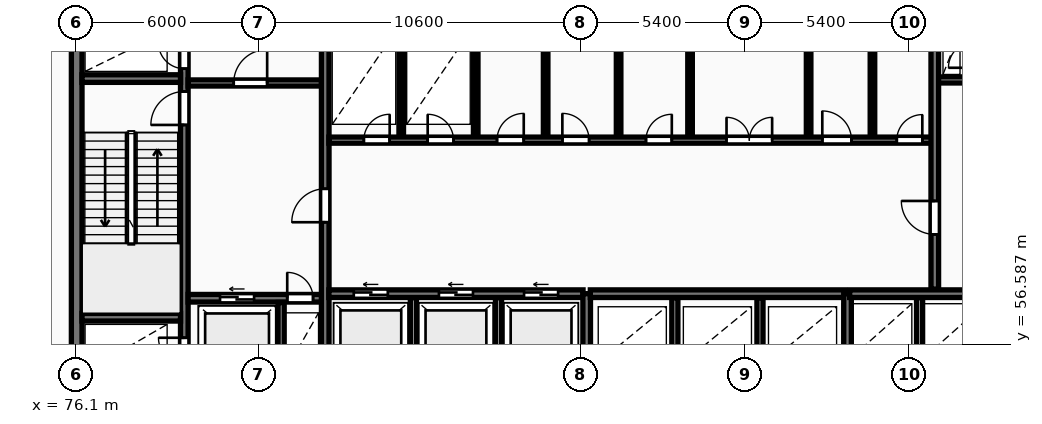
"""IFC4 building model, lengths in metres.
Left out: names, types, materials, properties, quantities, classifications, styles, units other than length and angle.
Written with IfcOpenShell. Run it as: python <this file> out.ifc"""

import sys

from ifc_helpers import new_model, si_unit, direction, frame, frame_2d, origin, place, context, subcontext, project, spatial, rectangle, extrude, element, fill, save


model = new_model("IFC4")
c1 = context("Model", 3, precision=1e-05, world=origin(), true_north=direction((0.0, 1.0)))
c2 = subcontext(c1, "Body", "Model", "MODEL_VIEW")
j1 = project(units=[si_unit("LENGTHUNIT", "METRE"), si_unit("PLANEANGLEUNIT", "RADIAN")], contexts=[c1])
p1 = place(None, origin())
s1 = spatial("IfcSite", under=j1, at=p1, CompositionType="ELEMENT")
p2 = place(p1, origin())
s2 = spatial("IfcBuilding", under=s1, at=p2, CompositionType="ELEMENT")
p3 = place(p2, frame((0.0, 0.0, 19.0)))
s3 = spatial("IfcBuildingStorey", under=s2, at=p3, CompositionType="ELEMENT", Elevation=19.0)
p4 = place(p3, frame((76.125, 55.375, 0.0), z_axis=(0.0, 0.0, 1.0), x_axis=(0.0, 1.0, 0.0)))
e1 = element("IfcWall", 1, at=p4, inside=s3, PredefinedType="SHEAR", context=c2, shape_type="SweptSolid", body=[
    extrude(rectangle(XDim=11.65, YDim=0.35, at=frame_2d((5.825, 0.0))), origin(), (0.0, 0.0, 1.0), 5.0),
])
p5 = place(p3, frame((79.665, 55.4, 0.0), z_axis=(0.0, 0.0, 1.0), x_axis=(0.0, 1.0, 0.0)))
e2 = element("IfcWall", 2, at=p5, inside=s3, PredefinedType="SHEAR", context=c2, shape_type="SweptSolid", body=[
    extrude(rectangle(XDim=11.6, YDim=0.25, at=frame_2d((5.8, 0.0))), origin(), (0.0, 0.0, 1.0), 5.0),
])
p6 = place(p5, frame((0.55, 0.0, 0.0)))
e3 = element("IfcOpeningElement", 3, at=p6, cuts=e2, PredefinedType="OPENING", context=c2, shape_type="SweptSolid", body=[
    extrude(rectangle(XDim=0.85, YDim=2.05, at=frame_2d((0.425, 1.025))), frame((0.0, 0.135, 0.0), z_axis=(0.0, -1.0, 0.0), x_axis=(1.0, 0.0, 0.0)), (0.0, 0.0, 1.0), 0.27),
])
p7 = place(p5, frame((8.4, 0.0, 0.0)))
e4 = element("IfcOpeningElement", 4, at=p7, cuts=e2, PredefinedType="OPENING", context=c2, shape_type="SweptSolid", body=[
    extrude(rectangle(XDim=1.1, YDim=2.1, at=frame_2d((0.55, 1.05))), frame((0.0, 0.135, 0.0), z_axis=(0.0, -1.0, 0.0), x_axis=(1.0, 0.0, 0.0)), (0.0, 0.0, 1.0), 0.27),
])
p8 = place(p5, frame((10.25, 0.0, 0.0)))
e5 = element("IfcOpeningElement", 5, at=p8, cuts=e2, PredefinedType="OPENING", context=c2, shape_type="SweptSolid", body=[
    extrude(rectangle(XDim=0.85, YDim=2.05, at=frame_2d((0.425, 1.025))), frame((0.0, 0.135, 0.0), z_axis=(0.0, -1.0, 0.0), x_axis=(1.0, 0.0, 0.0)), (0.0, 0.0, 1.0), 0.27),
])
for number, where, z_axis, x_axis in (
    (6, (76.3, 57.475, 0.0), (0.0, 0.0, 1.0), (1.0, 0.0, 0.0)),
    (7, (76.3, 65.325, 0.0), (0.0, 0.0, 1.0), (1.0, 0.0, 0.0)),
):
    element("IfcWall", number, at=place(p3, frame(where, z_axis=z_axis, x_axis=x_axis)), inside=s3, PredefinedType="SHEAR", context=c2, shape_type="SweptSolid", body=[
        extrude(rectangle(XDim=3.24, YDim=0.25, at=frame_2d((1.62, 0.0))), origin(), (0.0, 0.0, 1.0), 5.0),
    ])
p9 = place(p3, frame((79.79, 58.1, 0.0), z_axis=(0.0, 0.0, 1.0), x_axis=(1.0, 0.0, 0.0)))
e8 = element("IfcWall", 8, at=p9, inside=s3, PredefinedType="SHEAR", context=c2, shape_type="SweptSolid", body=[
    extrude(rectangle(XDim=4.39, YDim=0.25, at=frame_2d((2.195, 0.0))), origin(), (0.0, 0.0, 1.0), 5.0),
])
p10 = place(p9, frame((1.05, 0.0, 0.0)))
e9 = element("IfcOpeningElement", 9, at=p10, cuts=e8, PredefinedType="OPENING", context=c2, shape_type="SweptSolid", body=[
    extrude(rectangle(XDim=1.12, YDim=2.12, at=frame_2d((0.56, 1.06))), frame((0.0, 0.135, 0.0), z_axis=(0.0, -1.0, 0.0), x_axis=(1.0, 0.0, 0.0)), (0.0, 0.0, 1.0), 0.27),
])
p11 = place(p9, frame((3.26, 0.0, 0.0)))
e10 = element("IfcOpeningElement", 10, at=p11, cuts=e8, PredefinedType="OPENING", context=c2, shape_type="SweptSolid", body=[
    extrude(rectangle(XDim=0.85, YDim=2.05, at=frame_2d((0.425, 1.025))), frame((0.0, 0.135, 0.0), z_axis=(0.0, -1.0, 0.0), x_axis=(1.0, 0.0, 0.0)), (0.0, 0.0, 1.0), 0.27),
])
p12 = place(p3, frame((82.85, 55.4, 0.0), z_axis=(0.0, 0.0, 1.0), x_axis=(0.0, 1.0, 0.0)))
e11 = element("IfcWall", 11, at=p12, inside=s3, PredefinedType="PARTITIONING", context=c2, shape_type="SweptSolid", body=[
    extrude(rectangle(XDim=2.56, YDim=0.2, at=frame_2d((1.28, 0.0))), origin(), (0.0, 0.0, 1.0), 4.68),
])
p13 = place(p3, frame((79.79, 65.18, 0.0), z_axis=(0.0, 0.0, 1.0), x_axis=(1.0, 0.0, 0.0)))
e12 = element("IfcWall", 12, at=p13, inside=s3, PredefinedType="PARTITIONING", context=c2, shape_type="SweptSolid", body=[
    extrude(rectangle(XDim=4.39, YDim=0.2, at=frame_2d((2.195, 0.0))), origin(), (0.0, 0.0, 1.0), 4.68),
])
p14 = place(p13, frame((1.5, 0.0, 0.0)))
e13 = element("IfcOpeningElement", 13, at=p14, cuts=e12, PredefinedType="OPENING", context=c2, shape_type="SweptSolid", body=[
    extrude(rectangle(XDim=1.1, YDim=2.1, at=frame_2d((0.55, 1.05))), frame((0.0, 0.11, 0.0), z_axis=(0.0, -1.0, 0.0), x_axis=(1.0, 0.0, 0.0)), (0.0, 0.0, 1.0), 0.22),
])
p15 = place(p3, frame((84.3, 55.4, 0.0), z_axis=(0.0, 0.0, 1.0), x_axis=(0.0, 1.0, 0.0)))
e14 = element("IfcWall", 14, at=p15, inside=s3, PredefinedType="SHEAR", context=c2, shape_type="SweptSolid", body=[
    extrude(rectangle(XDim=11.6, YDim=0.25, at=frame_2d((5.8, 0.0))), origin(), (0.0, 0.0, 1.0), 5.0),
])
p16 = place(p15, frame((5.2, 0.0, 0.0)))
e15 = element("IfcOpeningElement", 15, at=p16, cuts=e14, PredefinedType="OPENING", context=c2, shape_type="SweptSolid", body=[
    extrude(rectangle(XDim=1.1, YDim=2.1, at=frame_2d((0.55, 1.05))), frame((0.0, 0.135, 0.0), z_axis=(0.0, -1.0, 0.0), x_axis=(1.0, 0.0, 0.0)), (0.0, 0.0, 1.0), 0.27),
])
for number, where, z_axis, x_axis in (
    (16, (87.2, 55.4, 0.0), (0.0, 0.0, 1.0), (0.0, 1.0, 0.0)),
    (17, (90.0, 55.4, 0.0), (0.0, 0.0, 1.0), (0.0, 1.0, 0.0)),
):
    element("IfcWall", number, at=place(p3, frame(where, z_axis=z_axis, x_axis=x_axis)), inside=s3, PredefinedType="PARTITIONING", context=c2, shape_type="SweptSolid", body=[
        extrude(rectangle(XDim=2.72, YDim=0.2, at=frame_2d((1.36, 0.0))), origin(), (0.0, 0.0, 1.0), 4.68),
    ])
p17 = place(p3, frame((84.42, 58.25, 0.0), z_axis=(0.0, 0.0, 1.0), x_axis=(1.0, 0.0, 0.0)))
e18 = element("IfcWall", 18, at=p17, inside=s3, PredefinedType="SHEAR", context=c2, shape_type="SweptSolid", body=[
    extrude(rectangle(XDim=8.36, YDim=0.25, at=frame_2d((4.18, 0.0))), origin(), (0.0, 0.0, 1.0), 5.0),
])
p18 = place(p17, frame((0.82, 0.0, 0.0)))
e19 = element("IfcOpeningElement", 19, at=p18, cuts=e18, PredefinedType="OPENING", context=c2, shape_type="SweptSolid", body=[
    extrude(rectangle(XDim=1.12, YDim=2.12, at=frame_2d((0.56, 1.06))), frame((0.0, 0.135, 0.0), z_axis=(0.0, -1.0, 0.0), x_axis=(1.0, 0.0, 0.0)), (0.0, 0.0, 1.0), 0.27),
])
p19 = place(p17, frame((3.62, 0.0, 0.0)))
e20 = element("IfcOpeningElement", 20, at=p19, cuts=e18, PredefinedType="OPENING", context=c2, shape_type="SweptSolid", body=[
    extrude(rectangle(XDim=1.12, YDim=2.12, at=frame_2d((0.56, 1.06))), frame((0.0, 0.135, 0.0), z_axis=(0.0, -1.0, 0.0), x_axis=(1.0, 0.0, 0.0)), (0.0, 0.0, 1.0), 0.27),
])
p20 = place(p17, frame((6.42, 0.0, 0.0)))
e21 = element("IfcOpeningElement", 21, at=p20, cuts=e18, PredefinedType="OPENING", context=c2, shape_type="SweptSolid", body=[
    extrude(rectangle(XDim=1.12, YDim=2.12, at=frame_2d((0.56, 1.06))), frame((0.0, 0.135, 0.0), z_axis=(0.0, -1.0, 0.0), x_axis=(1.0, 0.0, 0.0)), (0.0, 0.0, 1.0), 0.27),
])
p21 = place(p3, frame((92.9, 55.4, 0.0), z_axis=(0.0, 0.0, 1.0), x_axis=(0.0, 1.0, 0.0)))
e22 = element("IfcWall", 22, at=p21, inside=s3, PredefinedType="SHEAR", context=c2, shape_type="SweptSolid", body=[
    extrude(rectangle(XDim=2.85, YDim=0.25, at=frame_2d((1.425, 0.0))), origin(), (0.0, 0.0, 1.0), 5.0),
])
for number, where, z_axis, x_axis in (
    (23, (95.8, 55.4, 0.0), (0.0, 0.0, 1.0), (0.0, 1.0, 0.0)),
    (24, (98.6, 55.4, 0.0), (0.0, 0.0, 1.0), (0.0, 1.0, 0.0)),
):
    element("IfcWall", number, at=place(p3, frame(where, z_axis=z_axis, x_axis=x_axis)), inside=s3, PredefinedType="PARTITIONING", context=c2, shape_type="SweptSolid", body=[
        extrude(rectangle(XDim=2.72, YDim=0.2, at=frame_2d((1.36, 0.0))), origin(), (0.0, 0.0, 1.0), 4.68),
    ])
p22 = place(p3, frame((93.02, 58.25, 0.0), z_axis=(0.0, 0.0, 1.0), x_axis=(1.0, 0.0, 0.0)))
e25 = element("IfcWall", 25, at=p22, inside=s3, PredefinedType="SHEAR", context=c2, shape_type="SweptSolid", body=[
    extrude(rectangle(XDim=8.36, YDim=0.25, at=frame_2d((4.18, 0.0))), origin(), (0.0, 0.0, 1.0), 5.0),
])
p23 = place(p3, frame((101.48, 55.4, 0.0), z_axis=(0.0, 0.0, 1.0), x_axis=(0.0, 1.0, 0.0)))
e26 = element("IfcWall", 26, at=p23, inside=s3, PredefinedType="SHEAR", context=c2, shape_type="SweptSolid", body=[
    extrude(rectangle(XDim=2.85, YDim=0.25, at=frame_2d((1.425, 0.0))), origin(), (0.0, 0.0, 1.0), 5.0),
])
p24 = place(p3, frame((103.85, 55.4, 0.0), z_axis=(0.0, 0.0, 1.0), x_axis=(0.0, 1.0, 0.0)))
e27 = element("IfcWall", 27, at=p24, inside=s3, PredefinedType="PARTITIONING", context=c2, shape_type="SweptSolid", body=[
    extrude(rectangle(XDim=2.72, YDim=0.2, at=frame_2d((1.36, 0.0))), origin(), (0.0, 0.0, 1.0), 4.68),
])
p25 = place(p3, frame((101.55, 58.25, 0.0), z_axis=(0.0, 0.0, 1.0), x_axis=(1.0, 0.0, 0.0)))
e28 = element("IfcWall", 28, at=p25, inside=s3, PredefinedType="SHEAR", context=c2, shape_type="SweptSolid", body=[
    extrude(rectangle(XDim=4.6, YDim=0.25, at=frame_2d((2.3, 0.0))), origin(), (0.0, 0.0, 1.0), 5.0),
])
for number, where, z_axis, x_axis in (
    (29, (86.8, 63.4, 0.0), (0.0, 0.0, 1.0), (0.0, 1.0, 0.0)),
    (30, (89.25, 63.4, 0.0), (0.0, 0.0, 1.0), (0.0, 1.0, 0.0)),
    (31, (91.55, 63.4, 0.0), (0.0, 0.0, 1.0), (0.0, 1.0, 0.0)),
):
    element("IfcWall", number, at=place(p3, frame(where, z_axis=z_axis, x_axis=x_axis)), inside=s3, PredefinedType="PARTITIONING", context=c2, shape_type="SweptSolid", body=[
        extrude(rectangle(XDim=3.6, YDim=0.15, at=frame_2d((1.8, 0.0))), origin(), (0.0, 0.0, 1.0), 4.68),
    ])
for number, where, z_axis, x_axis in (
    (32, (93.95, 63.4, 0.0), (0.0, 0.0, 1.0), (0.0, 1.0, 0.0)),
    (33, (102.3, 63.4, 0.0), (0.0, 0.0, 1.0), (0.0, 1.0, 0.0)),
):
    element("IfcWall", number, at=place(p3, frame(where, z_axis=z_axis, x_axis=x_axis)), inside=s3, PredefinedType="PARTITIONING", context=c2, shape_type="SweptSolid", body=[
        extrude(rectangle(XDim=3.6, YDim=0.15, at=frame_2d((1.8, 0.0))), origin(), (0.0, 0.0, 1.0), 3.43),
    ])
for number, where, z_axis, x_axis in (
    (34, (96.3, 63.4, 0.0), (0.0, 0.0, 1.0), (0.0, 1.0, 0.0)),
    (35, (100.2, 63.4, 0.0), (0.0, 0.0, 1.0), (0.0, 1.0, 0.0)),
):
    element("IfcWall", number, at=place(p3, frame(where, z_axis=z_axis, x_axis=x_axis)), inside=s3, PredefinedType="PARTITIONING", context=c2, shape_type="SweptSolid", body=[
        extrude(rectangle(XDim=3.6, YDim=0.15, at=frame_2d((1.8, 0.0))), origin(), (0.0, 0.0, 1.0), 4.68),
    ])
p26 = place(p3, frame((84.42, 63.3, 0.0), z_axis=(0.0, 0.0, 1.0), x_axis=(1.0, 0.0, 0.0)))
e36 = element("IfcWall", 36, at=p26, inside=s3, PredefinedType="PARTITIONING", context=c2, shape_type="SweptSolid", body=[
    extrude(rectangle(XDim=19.83, YDim=0.2, at=frame_2d((9.915, 0.0))), origin(), (0.0, 0.0, 1.0), 4.68),
])
p27 = place(p26, frame((1.15, 0.0, 0.0)))
e37 = element("IfcOpeningElement", 37, at=p27, cuts=e36, PredefinedType="OPENING", context=c2, shape_type="SweptSolid", body=[
    extrude(rectangle(XDim=0.85, YDim=2.05, at=frame_2d((0.425, 1.025))), frame((0.0, 0.11, 0.0), z_axis=(0.0, -1.0, 0.0), x_axis=(1.0, 0.0, 0.0)), (0.0, 0.0, 1.0), 0.22),
])
p28 = place(p26, frame((3.25, 0.0, 0.0)))
e38 = element("IfcOpeningElement", 38, at=p28, cuts=e36, PredefinedType="OPENING", context=c2, shape_type="SweptSolid", body=[
    extrude(rectangle(XDim=0.85, YDim=2.05, at=frame_2d((0.425, 1.025))), frame((0.0, 0.11, 0.0), z_axis=(0.0, -1.0, 0.0), x_axis=(1.0, 0.0, 0.0)), (0.0, 0.0, 1.0), 0.22),
])
p29 = place(p26, frame((13.08, 0.0, 0.0)))
e39 = element("IfcOpeningElement", 39, at=p29, cuts=e36, PredefinedType="OPENING", context=c2, shape_type="SweptSolid", body=[
    extrude(rectangle(XDim=1.5, YDim=2.2, at=frame_2d((0.75, 1.1))), frame((0.0, 0.11, 0.0), z_axis=(0.0, -1.0, 0.0), x_axis=(1.0, 0.0, 0.0)), (0.0, 0.0, 1.0), 0.22),
])
p30 = place(p26, frame((5.53, 0.0, 0.0)))
e40 = element("IfcOpeningElement", 40, at=p30, cuts=e36, PredefinedType="OPENING", context=c2, shape_type="SweptSolid", body=[
    extrude(rectangle(XDim=0.88, YDim=2.06, at=frame_2d((0.44, 1.03))), frame((0.0, 0.11, 0.0), z_axis=(0.0, -1.0, 0.0), x_axis=(1.0, 0.0, 0.0)), (0.0, 0.0, 1.0), 0.22),
])
p31 = place(p26, frame((7.68, 0.0, 0.0)))
e41 = element("IfcOpeningElement", 41, at=p31, cuts=e36, PredefinedType="OPENING", context=c2, shape_type="SweptSolid", body=[
    extrude(rectangle(XDim=0.88, YDim=2.06, at=frame_2d((0.44, 1.03))), frame((0.0, 0.11, 0.0), z_axis=(0.0, -1.0, 0.0), x_axis=(1.0, 0.0, 0.0)), (0.0, 0.0, 1.0), 0.22),
])
p32 = place(p26, frame((10.43, 0.0, 0.0)))
e42 = element("IfcOpeningElement", 42, at=p32, cuts=e36, PredefinedType="OPENING", context=c2, shape_type="SweptSolid", body=[
    extrude(rectangle(XDim=0.85, YDim=2.05, at=frame_2d((0.425, 1.025))), frame((0.0, 0.11, 0.0), z_axis=(0.0, -1.0, 0.0), x_axis=(1.0, 0.0, 0.0)), (0.0, 0.0, 1.0), 0.22),
])
p33 = place(p26, frame((16.23, 0.0, 0.0)))
e43 = element("IfcOpeningElement", 43, at=p33, cuts=e36, PredefinedType="OPENING", context=c2, shape_type="SweptSolid", body=[
    extrude(rectangle(XDim=0.96, YDim=2.1, at=frame_2d((0.48, 1.05))), frame((0.0, 0.11, 0.0), z_axis=(0.0, -1.0, 0.0), x_axis=(1.0, 0.0, 0.0)), (0.0, 0.0, 1.0), 0.22),
])
p34 = place(p26, frame((18.68, 0.0, 0.0)))
e44 = element("IfcOpeningElement", 44, at=p34, cuts=e36, PredefinedType="OPENING", context=c2, shape_type="SweptSolid", body=[
    extrude(rectangle(XDim=0.84, YDim=2.04, at=frame_2d((0.42, 1.02))), frame((0.0, 0.11, 0.0), z_axis=(0.0, -1.0, 0.0), x_axis=(1.0, 0.0, 0.0)), (0.0, 0.0, 1.0), 0.22),
])
p35 = place(p3, frame((104.45, 65.28, 0.0), z_axis=(0.0, 0.0, 1.0), x_axis=(1.0, 0.0, 0.0)))
e45 = element("IfcWall", 45, at=p35, inside=s3, PredefinedType="PARTITIONING", context=c2, shape_type="SweptSolid", body=[
    extrude(rectangle(XDim=1.2, YDim=0.2, at=frame_2d((0.6, 0.0))), origin(), (0.0, 0.0, 1.0), 4.68),
])
p36 = place(p3, frame((104.35, 58.4, 0.0), z_axis=(0.0, 0.0, 1.0), x_axis=(0.0, 1.0, 0.0)))
e46 = element("IfcWall", 46, at=p36, inside=s3, PredefinedType="SHEAR", context=c2, shape_type="SweptSolid", body=[
    extrude(rectangle(XDim=8.6, YDim=0.25, at=frame_2d((4.3, 0.0))), origin(), (0.0, 0.0, 1.0), 5.0),
])
p37 = place(p36, frame((1.8, 0.0, 0.0)))
e47 = element("IfcOpeningElement", 47, at=p37, cuts=e46, PredefinedType="OPENING", context=c2, shape_type="SweptSolid", body=[
    extrude(rectangle(XDim=1.1, YDim=2.1, at=frame_2d((0.55, 1.05))), frame((0.0, 0.135, 0.0), z_axis=(0.0, -1.0, 0.0), x_axis=(1.0, 0.0, 0.0)), (0.0, 0.0, 1.0), 0.27),
])
p38 = place(p6, origin())
e48 = element("IfcDoor", 48, at=p38, inside=s3, OperationType="SINGLE_SWING_RIGHT", PredefinedType="DOOR", context=c2, shape_type="SweptSolid", body=[
    extrude(rectangle(XDim=0.85, YDim=2.05, at=frame_2d((0.425, 1.025))), frame((0.0, 0.025, 0.0), z_axis=(0.0, -1.0, 0.0), x_axis=(1.0, 0.0, 0.0)), (0.0, 0.0, 1.0), 0.05),
])
fill(e3, e48)
p39 = place(p7, origin())
e49 = element("IfcDoor", 49, at=p39, inside=s3, OperationType="SINGLE_SWING_LEFT", PredefinedType="DOOR", context=c2, shape_type="SweptSolid", body=[
    extrude(rectangle(XDim=1.1, YDim=2.1, at=frame_2d((0.55, 1.05))), frame((0.0, 0.025, 0.0), z_axis=(0.0, -1.0, 0.0), x_axis=(1.0, 0.0, 0.0)), (0.0, 0.0, 1.0), 0.05),
])
fill(e4, e49)
p40 = place(p8, origin())
e50 = element("IfcDoor", 50, at=p40, inside=s3, OperationType="SINGLE_SWING_RIGHT", PredefinedType="DOOR", context=c2, shape_type="SweptSolid", body=[
    extrude(rectangle(XDim=0.85, YDim=2.05, at=frame_2d((0.425, 1.025))), frame((0.0, 0.025, 0.0), z_axis=(0.0, -1.0, 0.0), x_axis=(1.0, 0.0, 0.0)), (0.0, 0.0, 1.0), 0.05),
])
fill(e5, e50)
p41 = place(p10, origin())
e51 = element("IfcDoor", 51, at=p41, inside=s3, OperationType="SLIDING_TO_LEFT", PredefinedType="DOOR", context=c2, shape_type="SweptSolid", body=[
    extrude(rectangle(XDim=1.12, YDim=2.12, at=frame_2d((0.56, 1.06))), frame((0.0, 0.025, 0.0), z_axis=(0.0, -1.0, 0.0), x_axis=(1.0, 0.0, 0.0)), (0.0, 0.0, 1.0), 0.05),
])
fill(e9, e51)
p42 = place(p11, origin())
e52 = element("IfcDoor", 52, at=p42, inside=s3, OperationType="SINGLE_SWING_LEFT", PredefinedType="DOOR", context=c2, shape_type="SweptSolid", body=[
    extrude(rectangle(XDim=0.85, YDim=2.05, at=frame_2d((0.425, 1.025))), frame((0.0, 0.025, 0.0), z_axis=(0.0, -1.0, 0.0), x_axis=(1.0, 0.0, 0.0)), (0.0, 0.0, 1.0), 0.05),
])
fill(e10, e52)
p43 = place(p14, origin())
e53 = element("IfcDoor", 53, at=p43, inside=s3, OperationType="SINGLE_SWING_RIGHT", PredefinedType="DOOR", context=c2, shape_type="SweptSolid", body=[
    extrude(rectangle(XDim=1.1, YDim=2.1, at=frame_2d((0.55, 1.05))), frame((0.0, 0.025, 0.0), z_axis=(0.0, -1.0, 0.0), x_axis=(1.0, 0.0, 0.0)), (0.0, 0.0, 1.0), 0.05),
])
fill(e13, e53)
p44 = place(p16, origin())
e54 = element("IfcDoor", 54, at=p44, inside=s3, OperationType="SINGLE_SWING_LEFT", PredefinedType="DOOR", context=c2, shape_type="SweptSolid", body=[
    extrude(rectangle(XDim=1.1, YDim=2.1, at=frame_2d((0.55, 1.05))), frame((0.0, 0.025, 0.0), z_axis=(0.0, -1.0, 0.0), x_axis=(1.0, 0.0, 0.0)), (0.0, 0.0, 1.0), 0.05),
])
fill(e15, e54)
p45 = place(p18, origin())
e55 = element("IfcDoor", 55, at=p45, inside=s3, OperationType="SLIDING_TO_LEFT", PredefinedType="DOOR", context=c2, shape_type="SweptSolid", body=[
    extrude(rectangle(XDim=1.12, YDim=2.12, at=frame_2d((0.56, 1.06))), frame((0.0, 0.025, 0.0), z_axis=(0.0, -1.0, 0.0), x_axis=(1.0, 0.0, 0.0)), (0.0, 0.0, 1.0), 0.05),
])
fill(e19, e55)
p46 = place(p19, origin())
e56 = element("IfcDoor", 56, at=p46, inside=s3, OperationType="SLIDING_TO_LEFT", PredefinedType="DOOR", context=c2, shape_type="SweptSolid", body=[
    extrude(rectangle(XDim=1.12, YDim=2.12, at=frame_2d((0.56, 1.06))), frame((0.0, 0.025, 0.0), z_axis=(0.0, -1.0, 0.0), x_axis=(1.0, 0.0, 0.0)), (0.0, 0.0, 1.0), 0.05),
])
fill(e20, e56)
p47 = place(p20, origin())
e57 = element("IfcDoor", 57, at=p47, inside=s3, OperationType="SLIDING_TO_LEFT", PredefinedType="DOOR", context=c2, shape_type="SweptSolid", body=[
    extrude(rectangle(XDim=1.12, YDim=2.12, at=frame_2d((0.56, 1.06))), frame((0.0, 0.025, 0.0), z_axis=(0.0, -1.0, 0.0), x_axis=(1.0, 0.0, 0.0)), (0.0, 0.0, 1.0), 0.05),
])
fill(e21, e57)
p48 = place(p27, origin())
e58 = element("IfcDoor", 58, at=p48, inside=s3, OperationType="SINGLE_SWING_RIGHT", PredefinedType="DOOR", context=c2, shape_type="SweptSolid", body=[
    extrude(rectangle(XDim=0.85, YDim=2.05, at=frame_2d((0.425, 1.025))), frame((0.0, 0.025, 0.0), z_axis=(0.0, -1.0, 0.0), x_axis=(1.0, 0.0, 0.0)), (0.0, 0.0, 1.0), 0.05),
])
fill(e37, e58)
p49 = place(p28, origin())
e59 = element("IfcDoor", 59, at=p49, inside=s3, OperationType="SINGLE_SWING_LEFT", PredefinedType="DOOR", context=c2, shape_type="SweptSolid", body=[
    extrude(rectangle(XDim=0.85, YDim=2.05, at=frame_2d((0.425, 1.025))), frame((0.0, 0.025, 0.0), z_axis=(0.0, -1.0, 0.0), x_axis=(1.0, 0.0, 0.0)), (0.0, 0.0, 1.0), 0.05),
])
fill(e38, e59)
p50 = place(p29, origin())
e60 = element("IfcDoor", 60, at=p50, inside=s3, OperationType="DOUBLE_DOOR_SINGLE_SWING", PredefinedType="DOOR", context=c2, shape_type="SweptSolid", body=[
    extrude(rectangle(XDim=1.5, YDim=2.2, at=frame_2d((0.75, 1.1))), frame((0.0, 0.025, 0.0), z_axis=(0.0, -1.0, 0.0), x_axis=(1.0, 0.0, 0.0)), (0.0, 0.0, 1.0), 0.05),
])
fill(e39, e60)
p51 = place(p30, origin())
e61 = element("IfcDoor", 61, at=p51, inside=s3, OperationType="SINGLE_SWING_RIGHT", PredefinedType="DOOR", context=c2, shape_type="SweptSolid", body=[
    extrude(rectangle(XDim=0.88, YDim=2.06, at=frame_2d((0.44, 1.03))), frame((0.0, 0.025, 0.0), z_axis=(0.0, -1.0, 0.0), x_axis=(1.0, 0.0, 0.0)), (0.0, 0.0, 1.0), 0.05),
])
fill(e40, e61)
p52 = place(p31, origin())
e62 = element("IfcDoor", 62, at=p52, inside=s3, OperationType="SINGLE_SWING_LEFT", PredefinedType="DOOR", context=c2, shape_type="SweptSolid", body=[
    extrude(rectangle(XDim=0.88, YDim=2.06, at=frame_2d((0.44, 1.03))), frame((0.0, 0.025, 0.0), z_axis=(0.0, -1.0, 0.0), x_axis=(1.0, 0.0, 0.0)), (0.0, 0.0, 1.0), 0.05),
])
fill(e41, e62)
p53 = place(p32, origin())
e63 = element("IfcDoor", 63, at=p53, inside=s3, OperationType="SINGLE_SWING_RIGHT", PredefinedType="DOOR", context=c2, shape_type="SweptSolid", body=[
    extrude(rectangle(XDim=0.85, YDim=2.05, at=frame_2d((0.425, 1.025))), frame((0.0, 0.025, 0.0), z_axis=(0.0, -1.0, 0.0), x_axis=(1.0, 0.0, 0.0)), (0.0, 0.0, 1.0), 0.05),
])
fill(e42, e63)
p54 = place(p33, origin())
e64 = element("IfcDoor", 64, at=p54, inside=s3, OperationType="SINGLE_SWING_LEFT", PredefinedType="DOOR", context=c2, shape_type="SweptSolid", body=[
    extrude(rectangle(XDim=0.96, YDim=2.1, at=frame_2d((0.48, 1.05))), frame((0.0, 0.025, 0.0), z_axis=(0.0, -1.0, 0.0), x_axis=(1.0, 0.0, 0.0)), (0.0, 0.0, 1.0), 0.05),
])
fill(e43, e64)
p55 = place(p34, origin())
e65 = element("IfcDoor", 65, at=p55, inside=s3, OperationType="SINGLE_SWING_RIGHT", PredefinedType="DOOR", context=c2, shape_type="SweptSolid", body=[
    extrude(rectangle(XDim=0.84, YDim=2.04, at=frame_2d((0.42, 1.02))), frame((0.0, 0.025, 0.0), z_axis=(0.0, -1.0, 0.0), x_axis=(1.0, 0.0, 0.0)), (0.0, 0.0, 1.0), 0.05),
])
fill(e44, e65)
p56 = place(p37, origin())
e66 = element("IfcDoor", 66, at=p56, inside=s3, OperationType="SINGLE_SWING_RIGHT", PredefinedType="DOOR", context=c2, shape_type="SweptSolid", body=[
    extrude(rectangle(XDim=1.1, YDim=2.1, at=frame_2d((0.55, 1.05))), frame((0.0, 0.025, 0.0), z_axis=(0.0, -1.0, 0.0), x_axis=(1.0, 0.0, 0.0)), (0.0, 0.0, 1.0), 0.05),
])
fill(e47, e66)
save(model, sys.argv[1])
